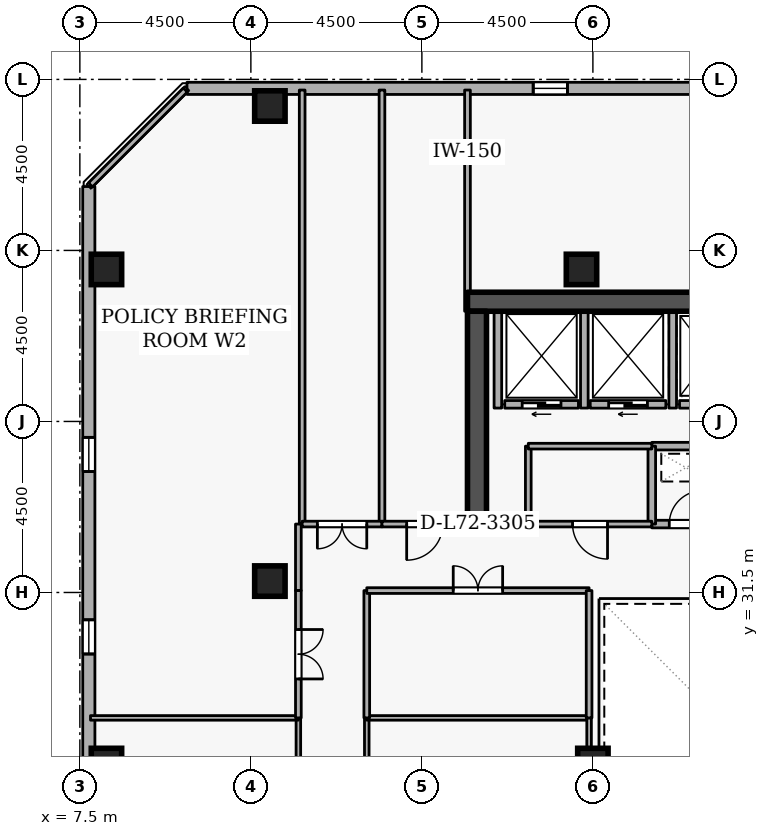
"""IFC4 building model, lengths in metres.
Left out: names, types, materials, properties, quantities, classifications, styles, units other than length and angle.
Written with IfcOpenShell. Run it as: python <this file> out.ifc"""

import sys

from ifc_helpers import new_model, si_unit, direction, frame, frame_2d, origin, origin_2d, place, context, subcontext, project, spatial, rectangle, extrude, element, fill, save


model = new_model("IFC4")
c1 = context("Model", 3, precision=1e-05, world=origin(), true_north=direction((0.0, 1.0)))
c2 = subcontext(c1, "Body", "Model", "MODEL_VIEW")
j1 = project(units=[si_unit("LENGTHUNIT", "METRE"), si_unit("PLANEANGLEUNIT", "RADIAN")], contexts=[c1])
p1 = place(None, origin())
s1 = spatial("IfcSite", under=j1, at=p1, CompositionType="ELEMENT")
p2 = place(p1, origin())
s2 = spatial("IfcBuilding", under=s1, at=p2, CompositionType="ELEMENT")
p3 = place(p2, frame((0.0, 0.0, 269.1)))
s3 = spatial("IfcBuildingStorey", under=s2, at=p3, CompositionType="ELEMENT", Elevation=269.1)
p4 = place(p3, frame((17.7, 39.15, 0.0), z_axis=(0.0, 0.0, 1.0), x_axis=(1.0, 0.0, 0.0)))
e1 = element("IfcWall", 1, at=p4, inside=s3, PredefinedType="SHEAR", context=c2, shape_type="SweptSolid", body=[
    extrude(rectangle(XDim=15.6, YDim=0.5, at=frame_2d((7.8, 0.0))), origin(), (0.0, 0.0, 1.0), 3.6),
])
p5 = place(p3, frame((17.95, 33.1, 0.0), z_axis=(0.0, 0.0, 1.0), x_axis=(0.0, 1.0, 0.0)))
e2 = element("IfcWall", 2, at=p5, inside=s3, PredefinedType="SHEAR", context=c2, shape_type="SweptSolid", body=[
    extrude(rectangle(XDim=5.8, YDim=0.5, at=frame_2d((2.9, 0.0))), origin(), (0.0, 0.0, 1.0), 3.6),
])
for number, where, z_axis, x_axis in (
    (3, (12.5, 44.3, 0.0), (0.0, 0.0, 1.0), (1.0, 0.0, 0.0)),
    (4, (8.2, 27.0, 0.0), (0.0, 0.0, 1.0), (1.0, 0.0, 0.0)),
    (5, (8.2, 40.0, 0.0), (0.0, 0.0, 1.0), (1.0, 0.0, 0.0)),
    (6, (12.5, 31.8, 0.0), (0.0, 0.0, 1.0), (1.0, 0.0, 0.0)),
    (7, (20.7, 40.0, 0.0), (0.0, 0.0, 1.0), (1.0, 0.0, 0.0)),
    (8, (21.0, 27.0, 0.0), (0.0, 0.0, 1.0), (1.0, 0.0, 0.0)),
):
    element("IfcColumn", number, at=place(p3, frame(where, z_axis=z_axis, x_axis=x_axis)), inside=s3, PredefinedType="COLUMN", context=c2, shape_type="SweptSolid", body=[
        extrude(rectangle(XDim=0.8, YDim=0.8, at=origin_2d()), origin(), (0.0, 0.0, 1.0), 3.6),
    ])
p6 = place(p3, frame((46.129, 44.763, 0.0), z_axis=(0.0, 0.0, 1.0), x_axis=(-0.999999998513, 5.4540124e-05, 0.0)))
e9 = element("IfcWall", 9, at=p6, inside=s3, PredefinedType="STANDARD", context=c2, shape_type="SweptSolid", body=[
    extrude(rectangle(XDim=35.811, YDim=0.32, at=frame_2d((17.905, 0.0))), origin(), (0.0, 0.0, 1.0), 2.7),
])
p7 = place(p6, frame((1.8, 0.0, 0.72)))
e10 = element("IfcOpeningElement", 10, at=p7, cuts=e9, PredefinedType="OPENING", context=c2, shape_type="SweptSolid", body=[
    extrude(rectangle(XDim=0.9, YDim=1.75, at=frame_2d((0.45, 0.875))), frame((0.0, 0.17, 0.0), z_axis=(0.0, -1.0, 0.0), x_axis=(1.0, 0.0, 0.0)), (0.0, 0.0, 1.0), 0.34),
])
p8 = place(p6, frame((11.4, 0.0, 0.72)))
e11 = element("IfcOpeningElement", 11, at=p8, cuts=e9, PredefinedType="OPENING", context=c2, shape_type="SweptSolid", body=[
    extrude(rectangle(XDim=0.9, YDim=1.75, at=frame_2d((0.45, 0.875))), frame((0.0, 0.17, 0.0), z_axis=(0.0, -1.0, 0.0), x_axis=(1.0, 0.0, 0.0)), (0.0, 0.0, 1.0), 0.34),
])
p9 = place(p6, frame((16.2, 0.0, 0.72)))
e12 = element("IfcOpeningElement", 12, at=p9, cuts=e9, PredefinedType="OPENING", context=c2, shape_type="SweptSolid", body=[
    extrude(rectangle(XDim=0.9, YDim=1.75, at=frame_2d((0.45, 0.875))), frame((0.0, 0.17, 0.0), z_axis=(0.0, -1.0, 0.0), x_axis=(1.0, 0.0, 0.0)), (0.0, 0.0, 1.0), 0.34),
])
p10 = place(p6, frame((25.8, 0.0, 0.72)))
e13 = element("IfcOpeningElement", 13, at=p10, cuts=e9, PredefinedType="OPENING", context=c2, shape_type="SweptSolid", body=[
    extrude(rectangle(XDim=0.9, YDim=1.75, at=frame_2d((0.45, 0.875))), frame((0.0, 0.17, 0.0), z_axis=(0.0, -1.0, 0.0), x_axis=(1.0, 0.0, 0.0)), (0.0, 0.0, 1.0), 0.34),
])
p11 = place(p3, frame((7.735, 42.181, 0.0), z_axis=(0.0, 0.0, 1.0), x_axis=(5.4540124e-05, -0.999999998513, 0.0)))
e14 = element("IfcWall", 14, at=p11, inside=s3, PredefinedType="STANDARD", context=c2, shape_type="SweptSolid", body=[
    extrude(rectangle(XDim=35.811, YDim=0.32, at=frame_2d((17.905, 0.0))), origin(), (0.0, 0.0, 1.0), 2.7),
])
p12 = place(p11, frame((6.6, 0.0, 0.72)))
e15 = element("IfcOpeningElement", 15, at=p12, cuts=e14, PredefinedType="OPENING", context=c2, shape_type="SweptSolid", body=[
    extrude(rectangle(XDim=0.9, YDim=1.75, at=frame_2d((0.45, 0.875))), frame((0.0, 0.17, 0.0), z_axis=(0.0, -1.0, 0.0), x_axis=(1.0, 0.0, 0.0)), (0.0, 0.0, 1.0), 0.34),
])
p13 = place(p11, frame((11.4, 0.0, 0.72)))
e16 = element("IfcOpeningElement", 16, at=p13, cuts=e14, PredefinedType="OPENING", context=c2, shape_type="SweptSolid", body=[
    extrude(rectangle(XDim=0.9, YDim=1.75, at=frame_2d((0.45, 0.875))), frame((0.0, 0.17, 0.0), z_axis=(0.0, -1.0, 0.0), x_axis=(1.0, 0.0, 0.0)), (0.0, 0.0, 1.0), 0.34),
])
p14 = place(p11, frame((21.0, 0.0, 0.72)))
e17 = element("IfcOpeningElement", 17, at=p14, cuts=e14, PredefinedType="OPENING", context=c2, shape_type="SweptSolid", body=[
    extrude(rectangle(XDim=0.9, YDim=1.75, at=frame_2d((0.45, 0.875))), frame((0.0, 0.17, 0.0), z_axis=(0.0, -1.0, 0.0), x_axis=(1.0, 0.0, 0.0)), (0.0, 0.0, 1.0), 0.34),
])
p15 = place(p11, frame((25.8, 0.0, 0.72)))
e18 = element("IfcOpeningElement", 18, at=p15, cuts=e14, PredefinedType="OPENING", context=c2, shape_type="SweptSolid", body=[
    extrude(rectangle(XDim=0.9, YDim=1.75, at=frame_2d((0.45, 0.875))), frame((0.0, 0.17, 0.0), z_axis=(0.0, -1.0, 0.0), x_axis=(1.0, 0.0, 0.0)), (0.0, 0.0, 1.0), 0.34),
])
p16 = place(p11, frame((30.6, 0.0, 0.72)))
e19 = element("IfcOpeningElement", 19, at=p16, cuts=e14, PredefinedType="OPENING", context=c2, shape_type="SweptSolid", body=[
    extrude(rectangle(XDim=0.9, YDim=1.75, at=frame_2d((0.45, 0.875))), frame((0.0, 0.17, 0.0), z_axis=(0.0, -1.0, 0.0), x_axis=(1.0, 0.0, 0.0)), (0.0, 0.0, 1.0), 0.34),
])
p17 = place(p3, frame((24.92, 36.45, 0.0), z_axis=(0.0, 0.0, 1.0), x_axis=(-1.0, 0.0, 0.0)))
e20 = element("IfcWall", 20, at=p17, inside=s3, PredefinedType="STANDARD", context=c2, shape_type="SweptSolid", body=[
    extrude(rectangle(XDim=1.64, YDim=0.2, at=frame_2d((0.82, 0.0))), origin(), (0.0, 0.0, 1.0), 3.34),
])
p18 = place(p17, frame((0.31, 0.0, 0.0)))
e21 = element("IfcOpeningElement", 21, at=p18, cuts=e20, PredefinedType="OPENING", context=c2, shape_type="SweptSolid", body=[
    extrude(rectangle(XDim=1.02, YDim=2.06, at=frame_2d((0.51, 1.03))), frame((0.0, 0.11, 0.0), z_axis=(0.0, -1.0, 0.0), x_axis=(1.0, 0.0, 0.0)), (0.0, 0.0, 1.0), 0.22),
])
p19 = place(p3, frame((22.92, 36.45, 0.0), z_axis=(0.0, 0.0, 1.0), x_axis=(-1.0, 0.0, 0.0)))
e22 = element("IfcWall", 22, at=p19, inside=s3, PredefinedType="STANDARD", context=c2, shape_type="SweptSolid", body=[
    extrude(rectangle(XDim=1.99, YDim=0.2, at=frame_2d((0.995, 0.0))), origin(), (0.0, 0.0, 1.0), 3.34),
])
p20 = place(p19, frame((0.485, 0.0, 0.0)))
e23 = element("IfcOpeningElement", 23, at=p20, cuts=e22, PredefinedType="OPENING", context=c2, shape_type="SweptSolid", body=[
    extrude(rectangle(XDim=1.02, YDim=2.06, at=frame_2d((0.51, 1.03))), frame((0.0, 0.11, 0.0), z_axis=(0.0, -1.0, 0.0), x_axis=(1.0, 0.0, 0.0)), (0.0, 0.0, 1.0), 0.22),
])
p21 = place(p3, frame((20.62, 36.45, 0.0), z_axis=(0.0, 0.0, 1.0), x_axis=(-1.0, 0.0, 0.0)))
e24 = element("IfcWall", 24, at=p21, inside=s3, PredefinedType="STANDARD", context=c2, shape_type="SweptSolid", body=[
    extrude(rectangle(XDim=1.94, YDim=0.2, at=frame_2d((0.97, 0.0))), origin(), (0.0, 0.0, 1.0), 3.34),
])
p22 = place(p21, frame((0.46, 0.0, 0.0)))
e25 = element("IfcOpeningElement", 25, at=p22, cuts=e24, PredefinedType="OPENING", context=c2, shape_type="SweptSolid", body=[
    extrude(rectangle(XDim=1.02, YDim=2.06, at=frame_2d((0.51, 1.03))), frame((0.0, 0.11, 0.0), z_axis=(0.0, -1.0, 0.0), x_axis=(1.0, 0.0, 0.0)), (0.0, 0.0, 1.0), 0.22),
])
for number, where, z_axis, x_axis in (
    (26, (23.1, 36.352, 0.0), (0.0, 0.0, 1.0), (0.0, 1.0, 0.0)),
    (27, (20.775, 36.352, 0.0), (0.0, 0.0, 1.0), (0.0, 1.0, 0.0)),
    (28, (18.5, 36.352, 0.0), (0.0, 0.0, 1.0), (0.0, 1.0, 0.0)),
):
    element("IfcWall", number, at=place(p3, frame(where, z_axis=z_axis, x_axis=x_axis)), inside=s3, PredefinedType="STANDARD", context=c2, shape_type="SweptSolid", body=[
        extrude(rectangle(XDim=2.536, YDim=0.2, at=frame_2d((1.268, 0.0))), origin(), (0.0, 0.0, 1.0), 3.34),
    ])
p23 = place(p3, frame((22.55, 33.3, 0.0), z_axis=(0.0, 0.0, 1.0), x_axis=(1.0, 0.0, 0.0)))
e29 = element("IfcWall", 29, at=p23, inside=s3, PredefinedType="STANDARD", context=c2, shape_type="SweptSolid", body=[
    extrude(rectangle(XDim=1.8, YDim=0.2, at=frame_2d((0.9, 0.0))), origin(), (0.0, 0.0, 1.0), 3.34),
])
p24 = place(p23, frame((0.46, 0.0, 0.0)))
e30 = element("IfcOpeningElement", 30, at=p24, cuts=e29, PredefinedType="OPENING", context=c2, shape_type="SweptSolid", body=[
    extrude(rectangle(XDim=0.88, YDim=2.04, at=frame_2d((0.44, 1.02))), frame((0.0, 0.11, 0.0), z_axis=(0.0, -1.0, 0.0), x_axis=(1.0, 0.0, 0.0)), (0.0, 0.0, 1.0), 0.22),
])
p25 = place(p3, frame((24.35, 35.35, 0.0), z_axis=(0.0, 0.0, 1.0), x_axis=(-1.0, 0.0, 0.0)))
e31 = element("IfcWall", 31, at=p25, inside=s3, PredefinedType="STANDARD", context=c2, shape_type="SweptSolid", body=[
    extrude(rectangle(XDim=1.8, YDim=0.2, at=frame_2d((0.9, 0.0))), origin(), (0.0, 0.0, 1.0), 3.34),
])
p26 = place(p3, frame((22.55, 35.35, 0.0), z_axis=(0.0, 0.0, 1.0), x_axis=(0.0, -1.0, 0.0)))
e32 = element("IfcWall", 32, at=p26, inside=s3, PredefinedType="STANDARD", context=c2, shape_type="SweptSolid", body=[
    extrude(rectangle(XDim=2.05, YDim=0.2, at=frame_2d((1.025, 0.0))), origin(), (0.0, 0.0, 1.0), 3.34),
])
p27 = place(p3, frame((19.3, 33.3, 0.0), z_axis=(0.0, 0.0, 1.0), x_axis=(0.0, 1.0, 0.0)))
e33 = element("IfcWall", 33, at=p27, inside=s3, PredefinedType="PARTITIONING", context=c2, shape_type="SweptSolid", body=[
    extrude(rectangle(XDim=2.05, YDim=0.15, at=frame_2d((1.025, 0.0))), origin(), (0.0, 0.0, 1.0), 3.34),
])
p28 = place(p3, frame((19.3, 35.35, 0.0), z_axis=(0.0, 0.0, 1.0), x_axis=(1.0, 0.0, 0.0)))
e34 = element("IfcWall", 34, at=p28, inside=s3, PredefinedType="PARTITIONING", context=c2, shape_type="SweptSolid", body=[
    extrude(rectangle(XDim=3.25, YDim=0.15, at=frame_2d((1.625, 0.0))), origin(), (0.0, 0.0, 1.0), 3.34),
])
p29 = place(p3, frame((22.55, 33.3, 0.0), z_axis=(0.0, 0.0, 1.0), x_axis=(-1.0, 0.0, 0.0)))
e35 = element("IfcWall", 35, at=p29, inside=s3, PredefinedType="PARTITIONING", context=c2, shape_type="SweptSolid", body=[
    extrude(rectangle(XDim=3.25, YDim=0.15, at=frame_2d((1.625, 0.0))), origin(), (0.0, 0.0, 1.0), 3.34),
])
p30 = place(p29, frame((1.165, 0.0, 0.0)))
e36 = element("IfcOpeningElement", 36, at=p30, cuts=e35, PredefinedType="OPENING", context=c2, shape_type="SweptSolid", body=[
    extrude(rectangle(XDim=0.92, YDim=2.08, at=frame_2d((0.46, 1.04))), frame((0.0, 0.085, 0.0), z_axis=(0.0, -1.0, 0.0), x_axis=(1.0, 0.0, 0.0)), (0.0, 0.0, 1.0), 0.17),
])
for number, where, z_axis, x_axis in (
    (37, (13.35, 33.3, 0.0), (0.0, 0.0, 1.0), (0.0, 1.0, 0.0)),
    (38, (15.45, 44.72, 0.0), (0.0, 0.0, 1.0), (0.0, -1.0, 0.0)),
):
    element("IfcWall", number, at=place(p3, frame(where, z_axis=z_axis, x_axis=x_axis)), inside=s3, PredefinedType="PARTITIONING", context=c2, shape_type="SweptSolid", body=[
        extrude(rectangle(XDim=11.42, YDim=0.15, at=frame_2d((5.71, 0.0))), origin(), (0.0, 0.0, 1.0), 3.34),
    ])
p31 = place(p3, frame((15.45, 33.3, 0.0), z_axis=(0.0, 0.0, 1.0), x_axis=(-1.0, 0.0, 0.0)))
e39 = element("IfcWall", 39, at=p31, inside=s3, PredefinedType="PARTITIONING", context=c2, shape_type="SweptSolid", body=[
    extrude(rectangle(XDim=2.1, YDim=0.15, at=frame_2d((1.05, 0.0))), origin(), (0.0, 0.0, 1.0), 3.34),
])
p32 = place(p31, frame((0.4, 0.0, 0.0)))
e40 = element("IfcOpeningElement", 40, at=p32, cuts=e39, PredefinedType="OPENING", context=c2, shape_type="SweptSolid", body=[
    extrude(rectangle(XDim=1.3, YDim=2.12, at=frame_2d((0.65, 1.06))), frame((0.0, 0.085, 0.0), z_axis=(0.0, -1.0, 0.0), x_axis=(1.0, 0.0, 0.0)), (0.0, 0.0, 1.0), 0.17),
])
p33 = place(p3, frame((17.7, 44.72, 0.0), z_axis=(0.0, 0.0, 1.0), x_axis=(0.0, -1.0, 0.0)))
e41 = element("IfcWall", 41, at=p33, inside=s3, PredefinedType="PARTITIONING", context=c2, shape_type="SweptSolid", body=[
    extrude(rectangle(XDim=5.82, YDim=0.15, at=frame_2d((2.91, 0.0))), origin(), (0.0, 0.0, 1.0), 2.545),
])
p34 = place(p3, frame((17.7, 33.3, 0.0), z_axis=(0.0, 0.0, 1.0), x_axis=(-1.0, 0.0, 0.0)))
e42 = element("IfcWall", 42, at=p34, inside=s3, PredefinedType="PARTITIONING", context=c2, shape_type="SweptSolid", body=[
    extrude(rectangle(XDim=2.25, YDim=0.15, at=frame_2d((1.125, 0.0))), origin(), (0.0, 0.0, 1.0), 3.34),
])
p35 = place(p34, frame((0.65, 0.0, 0.0)))
e43 = element("IfcOpeningElement", 43, at=p35, cuts=e42, PredefinedType="OPENING", context=c2, shape_type="SweptSolid", body=[
    extrude(rectangle(XDim=0.95, YDim=2.1, at=frame_2d((0.475, 1.05))), frame((0.0, 0.085, 0.0), z_axis=(0.0, -1.0, 0.0), x_axis=(1.0, 0.0, 0.0)), (0.0, 0.0, 1.0), 0.17),
])
p36 = place(p3, frame((13.25, 28.2, 0.0), z_axis=(0.0, 0.0, 1.0), x_axis=(0.0, -1.0, 0.0)))
e44 = element("IfcWall", 44, at=p36, inside=s3, PredefinedType="PARTITIONING", context=c2, shape_type="SweptSolid", body=[
    extrude(rectangle(XDim=5.75, YDim=0.12, at=frame_2d((2.875, 0.0))), origin(), (0.0, 0.0, 1.0), 3.34),
])
p37 = place(p36, frame((2.35, 0.0, 0.0)))
e45 = element("IfcOpeningElement", 45, at=p37, cuts=e44, PredefinedType="OPENING", context=c2, shape_type="SweptSolid", body=[
    extrude(rectangle(XDim=1.05, YDim=2.1, at=frame_2d((0.525, 1.05))), frame((0.0, 0.07, 0.0), z_axis=(0.0, -1.0, 0.0), x_axis=(1.0, 0.0, 0.0)), (0.0, 0.0, 1.0), 0.14),
])
p38 = place(p3, frame((7.78, 28.2, 0.0), z_axis=(0.0, 0.0, 1.0), x_axis=(1.0, 0.0, 0.0)))
e46 = element("IfcWall", 46, at=p38, inside=s3, PredefinedType="PARTITIONING", context=c2, shape_type="SweptSolid", body=[
    extrude(rectangle(XDim=5.47, YDim=0.12, at=frame_2d((2.735, 0.0))), origin(), (0.0, 0.0, 1.0), 3.34),
])
p39 = place(p3, frame((7.78, 42.225, 0.0), z_axis=(0.0, 0.0, 1.0), x_axis=(0.707106781187, 0.707106781187, 0.0)))
e47 = element("IfcWall", 47, at=p39, inside=s3, PredefinedType="PARTITIONING", context=c2, shape_type="SweptSolid", body=[
    extrude(rectangle(XDim=3.528, YDim=0.15, at=frame_2d((1.764, 0.0))), origin(), (0.0, 0.0, 1.0), 3.34),
])
p40 = place(p3, frame((13.25, 33.3, 0.0), z_axis=(0.0, 0.0, 1.0), x_axis=(0.0, -1.0, 0.0)))
e48 = element("IfcWall", 48, at=p40, inside=s3, PredefinedType="PARTITIONING", context=c2, shape_type="SweptSolid", body=[
    extrude(rectangle(XDim=1.75, YDim=0.15, at=frame_2d((0.875, 0.0))), origin(), (0.0, 0.0, 1.0), 3.34),
])
p41 = place(p3, frame((13.25, 31.55, 0.0), z_axis=(0.0, 0.0, 1.0), x_axis=(0.0, -1.0, 0.0)))
e49 = element("IfcWall", 49, at=p41, inside=s3, PredefinedType="PARTITIONING", context=c2, shape_type="SweptSolid", body=[
    extrude(rectangle(XDim=3.35, YDim=0.15, at=frame_2d((1.675, 0.0))), origin(), (0.0, 0.0, 1.0), 3.34),
])
p42 = place(p41, frame((1.025, 0.0, 0.0)))
e50 = element("IfcOpeningElement", 50, at=p42, cuts=e49, PredefinedType="OPENING", context=c2, shape_type="SweptSolid", body=[
    extrude(rectangle(XDim=1.3, YDim=2.12, at=frame_2d((0.65, 1.06))), frame((0.0, 0.085, 0.0), z_axis=(0.0, -1.0, 0.0), x_axis=(1.0, 0.0, 0.0)), (0.0, 0.0, 1.0), 0.17),
])
p43 = place(p3, frame((15.05, 22.45, 0.0), z_axis=(0.0, 0.0, 1.0), x_axis=(0.0, 1.0, 0.0)))
e51 = element("IfcWall", 51, at=p43, inside=s3, PredefinedType="PARTITIONING", context=c2, shape_type="SweptSolid", body=[
    extrude(rectangle(XDim=5.75, YDim=0.12, at=frame_2d((2.875, 0.0))), origin(), (0.0, 0.0, 1.0), 3.34),
])
p44 = place(p3, frame((15.05, 28.2, 0.0), z_axis=(0.0, 0.0, 1.0), x_axis=(1.0, 0.0, 0.0)))
e52 = element("IfcWall", 52, at=p44, inside=s3, PredefinedType="PARTITIONING", context=c2, shape_type="SweptSolid", body=[
    extrude(rectangle(XDim=5.85, YDim=0.12, at=frame_2d((2.925, 0.0))), origin(), (0.0, 0.0, 1.0), 3.34),
])
p45 = place(p3, frame((20.9, 28.2, 0.0), z_axis=(0.0, 0.0, 1.0), x_axis=(0.0, -1.0, 0.0)))
e53 = element("IfcWall", 53, at=p45, inside=s3, PredefinedType="PARTITIONING", context=c2, shape_type="SweptSolid", body=[
    extrude(rectangle(XDim=5.75, YDim=0.12, at=frame_2d((2.875, 0.0))), origin(), (0.0, 0.0, 1.0), 3.34),
])
p46 = place(p3, frame((15.05, 28.2, 0.0), z_axis=(0.0, 0.0, 1.0), x_axis=(0.0, 1.0, 0.0)))
e54 = element("IfcWall", 54, at=p46, inside=s3, PredefinedType="PARTITIONING", context=c2, shape_type="SweptSolid", body=[
    extrude(rectangle(XDim=3.35, YDim=0.15, at=frame_2d((1.675, 0.0))), origin(), (0.0, 0.0, 1.0), 3.34),
])
p47 = place(p3, frame((15.05, 31.55, 0.0), z_axis=(0.0, 0.0, 1.0), x_axis=(1.0, 0.0, 0.0)))
e55 = element("IfcWall", 55, at=p47, inside=s3, PredefinedType="PARTITIONING", context=c2, shape_type="SweptSolid", body=[
    extrude(rectangle(XDim=5.85, YDim=0.15, at=frame_2d((2.925, 0.0))), origin(), (0.0, 0.0, 1.0), 3.34),
])
p48 = place(p47, frame((2.275, 0.0, 0.0)))
e56 = element("IfcOpeningElement", 56, at=p48, cuts=e55, PredefinedType="OPENING", context=c2, shape_type="SweptSolid", body=[
    extrude(rectangle(XDim=1.3, YDim=2.12, at=frame_2d((0.65, 1.06))), frame((0.0, 0.085, 0.0), z_axis=(0.0, -1.0, 0.0), x_axis=(1.0, 0.0, 0.0)), (0.0, 0.0, 1.0), 0.17),
])
p49 = place(p3, frame((20.9, 31.55, 0.0), z_axis=(0.0, 0.0, 1.0), x_axis=(0.0, -1.0, 0.0)))
e57 = element("IfcWall", 57, at=p49, inside=s3, PredefinedType="PARTITIONING", context=c2, shape_type="SweptSolid", body=[
    extrude(rectangle(XDim=3.35, YDim=0.15, at=frame_2d((1.675, 0.0))), origin(), (0.0, 0.0, 1.0), 3.34),
])
p50 = place(p10, origin())
e58 = element("IfcWindow", 58, at=p50, inside=s3, PartitioningType="SINGLE_PANEL", PredefinedType="WINDOW", context=c2, shape_type="SweptSolid", body=[
    extrude(rectangle(XDim=0.9, YDim=1.75, at=frame_2d((0.45, 0.875))), frame((0.0, 0.03, 0.0), z_axis=(0.0, -1.0, 0.0), x_axis=(1.0, 0.0, 0.0)), (0.0, 0.0, 1.0), 0.06),
])
fill(e13, e58)
p51 = place(p12, origin())
e59 = element("IfcWindow", 59, at=p51, inside=s3, PartitioningType="SINGLE_PANEL", PredefinedType="WINDOW", context=c2, shape_type="SweptSolid", body=[
    extrude(rectangle(XDim=0.9, YDim=1.75, at=frame_2d((0.45, 0.875))), frame((0.0, 0.03, 0.0), z_axis=(0.0, -1.0, 0.0), x_axis=(1.0, 0.0, 0.0)), (0.0, 0.0, 1.0), 0.06),
])
fill(e15, e59)
p52 = place(p13, origin())
e60 = element("IfcWindow", 60, at=p52, inside=s3, PartitioningType="SINGLE_PANEL", PredefinedType="WINDOW", context=c2, shape_type="SweptSolid", body=[
    extrude(rectangle(XDim=0.9, YDim=1.75, at=frame_2d((0.45, 0.875))), frame((0.0, 0.03, 0.0), z_axis=(0.0, -1.0, 0.0), x_axis=(1.0, 0.0, 0.0)), (0.0, 0.0, 1.0), 0.06),
])
fill(e16, e60)
p53 = place(p20, origin())
e61 = element("IfcDoor", 61, at=p53, inside=s3, OperationType="SLIDING_TO_LEFT", PredefinedType="DOOR", context=c2, shape_type="SweptSolid", body=[
    extrude(rectangle(XDim=1.02, YDim=2.06, at=frame_2d((0.51, 1.03))), frame((0.0, 0.025, 0.0), z_axis=(0.0, -1.0, 0.0), x_axis=(1.0, 0.0, 0.0)), (0.0, 0.0, 1.0), 0.05),
])
fill(e23, e61)
p54 = place(p22, origin())
e62 = element("IfcDoor", 62, at=p54, inside=s3, OperationType="SLIDING_TO_LEFT", PredefinedType="DOOR", context=c2, shape_type="SweptSolid", body=[
    extrude(rectangle(XDim=1.02, YDim=2.06, at=frame_2d((0.51, 1.03))), frame((0.0, 0.025, 0.0), z_axis=(0.0, -1.0, 0.0), x_axis=(1.0, 0.0, 0.0)), (0.0, 0.0, 1.0), 0.05),
])
fill(e25, e62)
p55 = place(p24, origin())
e63 = element("IfcDoor", 63, at=p55, inside=s3, OperationType="SINGLE_SWING_RIGHT", PredefinedType="DOOR", context=c2, shape_type="SweptSolid", body=[
    extrude(rectangle(XDim=0.88, YDim=2.04, at=frame_2d((0.44, 1.02))), frame((0.0, 0.025, 0.0), z_axis=(0.0, -1.0, 0.0), x_axis=(1.0, 0.0, 0.0)), (0.0, 0.0, 1.0), 0.05),
])
fill(e30, e63)
p56 = place(p30, origin())
e64 = element("IfcDoor", 64, at=p56, inside=s3, OperationType="SINGLE_SWING_LEFT", PredefinedType="DOOR", context=c2, shape_type="SweptSolid", body=[
    extrude(rectangle(XDim=0.92, YDim=2.08, at=frame_2d((0.46, 1.04))), frame((0.0, 0.025, 0.0), z_axis=(0.0, -1.0, 0.0), x_axis=(1.0, 0.0, 0.0)), (0.0, 0.0, 1.0), 0.05),
])
fill(e36, e64)
p57 = place(p32, origin())
e65 = element("IfcDoor", 65, at=p57, inside=s3, OperationType="DOUBLE_DOOR_SINGLE_SWING", PredefinedType="DOOR", context=c2, shape_type="SweptSolid", body=[
    extrude(rectangle(XDim=1.3, YDim=2.12, at=frame_2d((0.65, 1.06))), frame((0.0, 0.025, 0.0), z_axis=(0.0, -1.0, 0.0), x_axis=(1.0, 0.0, 0.0)), (0.0, 0.0, 1.0), 0.05),
])
fill(e40, e65)
p58 = place(p35, origin())
e66 = element("IfcDoor", 66, at=p58, inside=s3, OperationType="SINGLE_SWING_RIGHT", PredefinedType="DOOR", context=c2, shape_type="SweptSolid", body=[
    extrude(rectangle(XDim=0.95, YDim=2.1, at=frame_2d((0.475, 1.05))), frame((0.0, 0.025, 0.0), z_axis=(0.0, -1.0, 0.0), x_axis=(1.0, 0.0, 0.0)), (0.0, 0.0, 1.0), 0.05),
])
fill(e43, e66)
p59 = place(p42, origin())
e67 = element("IfcDoor", 67, at=p59, inside=s3, OperationType="DOUBLE_DOOR_SINGLE_SWING", PredefinedType="DOOR", context=c2, shape_type="SweptSolid", body=[
    extrude(rectangle(XDim=1.3, YDim=2.12, at=frame_2d((0.65, 1.06))), frame((0.0, 0.025, 0.0), z_axis=(0.0, -1.0, 0.0), x_axis=(1.0, 0.0, 0.0)), (0.0, 0.0, 1.0), 0.05),
])
fill(e50, e67)
p60 = place(p48, origin())
e68 = element("IfcDoor", 68, at=p60, inside=s3, OperationType="DOUBLE_DOOR_SINGLE_SWING", PredefinedType="DOOR", context=c2, shape_type="SweptSolid", body=[
    extrude(rectangle(XDim=1.3, YDim=2.12, at=frame_2d((0.65, 1.06))), frame((0.0, 0.025, 0.0), z_axis=(0.0, -1.0, 0.0), x_axis=(1.0, 0.0, 0.0)), (0.0, 0.0, 1.0), 0.05),
])
fill(e56, e68)
save(model, sys.argv[1])
